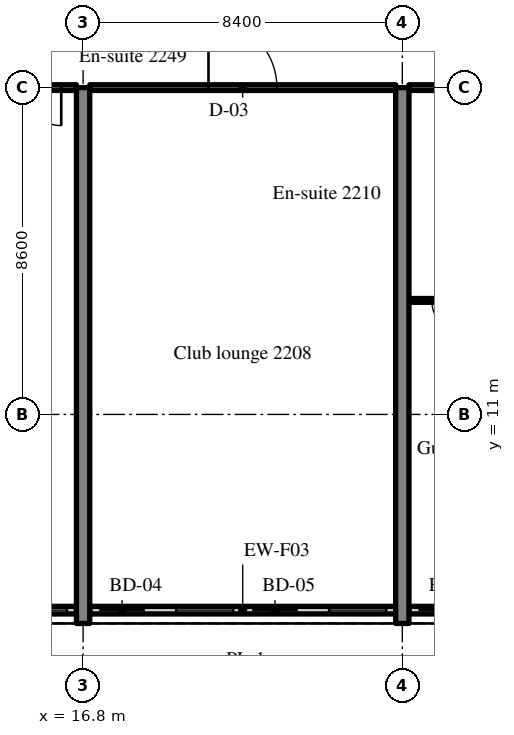
"""IFC4 building model, lengths in metres.
Left out: names, types, materials, properties, quantities, classifications, styles, units other than length and angle.
Written with IfcOpenShell. Run it as: python <this file> out.ifc"""

import sys

from ifc_helpers import new_model, si_unit, direction, frame, frame_2d, origin, place, context, subcontext, project, spatial, rectangle, extrude, source, transform, mapped, element, fill, save


model = new_model("IFC4")
c1 = context("Model", 3, precision=1e-05, world=origin(), true_north=direction((0.0, 1.0)))
c2 = subcontext(c1, "Body", "Model", "MODEL_VIEW")
j1 = project(units=[si_unit("LENGTHUNIT", "METRE"), si_unit("PLANEANGLEUNIT", "RADIAN")], contexts=[c1])
p1 = place(None, origin())
s1 = spatial("IfcSite", under=j1, at=p1, CompositionType="ELEMENT")
p2 = place(p1, origin())
s2 = spatial("IfcBuilding", under=s1, at=p2, CompositionType="ELEMENT")
p3 = place(p2, frame((0.0, 0.0, 95.2)))
s3 = spatial("IfcBuildingStorey", under=s2, at=p3, CompositionType="ELEMENT", Elevation=95.2)
m1 = source(origin(), c2, "Body", "SweptSolid", [
    extrude(rectangle(XDim=14.1, YDim=0.35, at=frame_2d((7.05, 0.0))), origin(), (0.0, 0.0, 1.0), 3.52),
])
for number, where, z_axis, x_axis in (
    (1, (16.8, 5.5, 0.0), (0.0, 0.0, 1.0), (0.0, 1.0, 0.0)),
    (2, (25.2, 5.5, 0.0), (0.0, 0.0, 1.0), (0.0, 1.0, 0.0)),
):
    element("IfcWall", number, at=place(p3, frame(where, z_axis=z_axis, x_axis=x_axis)), inside=s3, PredefinedType="SHEAR", context=c2, shape_type="MappedRepresentation", body=[
        mapped(m1, transform((0.0, 0.0, 0.0), scale=1.0)),
    ])
m2 = source(origin(), c2, "Body", "SweptSolid", [
    extrude(rectangle(XDim=8.05, YDim=0.2, at=frame_2d((4.025, 0.0))), origin(), (0.0, 0.0, 1.0), 2.82),
])
p4 = place(p3, frame((8.575, 5.85, 0.0), z_axis=(0.0, 0.0, 1.0), x_axis=(1.0, 0.0, 0.0)))
e3 = element("IfcWall", 3, at=p4, inside=s3, PredefinedType="SOLIDWALL", context=c2, shape_type="MappedRepresentation", body=[
    mapped(m2, transform((0.0, 0.0, 0.0), scale=1.0)),
])
m3 = source(origin(), c2, "Body", "SweptSolid", [
    extrude(rectangle(XDim=1.2, YDim=2.4, at=frame_2d((0.6, 1.2))), frame((0.0, 0.11, 0.0), z_axis=(0.0, -1.0, 0.0), x_axis=(1.0, 0.0, 0.0)), (0.0, 0.0, 1.0), 0.22),
])
p5 = place(p4, frame((0.25, 0.0, 0.0)))
e4 = element("IfcOpeningElement", 4, at=p5, cuts=e3, PredefinedType="OPENING", context=c2, shape_type="MappedRepresentation", body=[
    mapped(m3, transform((0.0, 0.0, 0.0), scale=1.0)),
])
m4 = source(origin(), c2, "Body", "SweptSolid", [
    extrude(rectangle(XDim=1.5, YDim=1.5, at=frame_2d((0.75, 0.75))), frame((0.0, 0.11, 0.0), z_axis=(0.0, -1.0, 0.0), x_axis=(1.0, 0.0, 0.0)), (0.0, 0.0, 1.0), 0.22),
])
p6 = place(p4, frame((2.275, 0.0, 0.9)))
e5 = element("IfcOpeningElement", 5, at=p6, cuts=e3, PredefinedType="OPENING", context=c2, shape_type="MappedRepresentation", body=[
    mapped(m4, transform((0.0, 0.0, 0.0), scale=1.0)),
])
p7 = place(p4, frame((4.275, 0.0, 0.0)))
e6 = element("IfcOpeningElement", 6, at=p7, cuts=e3, PredefinedType="OPENING", context=c2, shape_type="MappedRepresentation", body=[
    mapped(m3, transform((0.0, 0.0, 0.0), scale=1.0)),
])
p8 = place(p4, frame((6.3, 0.0, 0.9)))
e7 = element("IfcOpeningElement", 7, at=p8, cuts=e3, PredefinedType="OPENING", context=c2, shape_type="MappedRepresentation", body=[
    mapped(m4, transform((0.0, 0.0, 0.0), scale=1.0)),
])
m5 = source(origin(), c2, "Body", "SweptSolid", [
    extrude(rectangle(XDim=8.05, YDim=0.2, at=frame_2d((4.025, 0.0))), origin(), (0.0, 0.0, 1.0), 2.82),
])
p9 = place(p3, frame((16.975, 5.85, 0.0), z_axis=(0.0, 0.0, 1.0), x_axis=(1.0, 0.0, 0.0)))
e8 = element("IfcWall", 8, at=p9, inside=s3, PredefinedType="SOLIDWALL", context=c2, shape_type="MappedRepresentation", body=[
    mapped(m5, transform((0.0, 0.0, 0.0), scale=1.0)),
])
p10 = place(p9, frame((0.25, 0.0, 0.0)))
e9 = element("IfcOpeningElement", 9, at=p10, cuts=e8, PredefinedType="OPENING", context=c2, shape_type="MappedRepresentation", body=[
    mapped(m3, transform((0.0, 0.0, 0.0), scale=1.0)),
])
p11 = place(p9, frame((2.275, 0.0, 0.9)))
e10 = element("IfcOpeningElement", 10, at=p11, cuts=e8, PredefinedType="OPENING", context=c2, shape_type="MappedRepresentation", body=[
    mapped(m4, transform((0.0, 0.0, 0.0), scale=1.0)),
])
p12 = place(p9, frame((4.275, 0.0, 0.0)))
e11 = element("IfcOpeningElement", 11, at=p12, cuts=e8, PredefinedType="OPENING", context=c2, shape_type="MappedRepresentation", body=[
    mapped(m3, transform((0.0, 0.0, 0.0), scale=1.0)),
])
p13 = place(p9, frame((6.3, 0.0, 0.9)))
e12 = element("IfcOpeningElement", 12, at=p13, cuts=e8, PredefinedType="OPENING", context=c2, shape_type="MappedRepresentation", body=[
    mapped(m4, transform((0.0, 0.0, 0.0), scale=1.0)),
])
p14 = place(p3, frame((25.375, 5.85, 0.0), z_axis=(0.0, 0.0, 1.0), x_axis=(1.0, 0.0, 0.0)))
e13 = element("IfcWall", 13, at=p14, inside=s3, PredefinedType="SOLIDWALL", context=c2, shape_type="MappedRepresentation", body=[
    mapped(m2, transform((0.0, 0.0, 0.0), scale=1.0)),
])
p15 = place(p14, frame((0.25, 0.0, 0.0)))
e14 = element("IfcOpeningElement", 14, at=p15, cuts=e13, PredefinedType="OPENING", context=c2, shape_type="MappedRepresentation", body=[
    mapped(m3, transform((0.0, 0.0, 0.0), scale=1.0)),
])
p16 = place(p14, frame((2.275, 0.0, 0.9)))
e15 = element("IfcOpeningElement", 15, at=p16, cuts=e13, PredefinedType="OPENING", context=c2, shape_type="MappedRepresentation", body=[
    mapped(m4, transform((0.0, 0.0, 0.0), scale=1.0)),
])
p17 = place(p14, frame((4.275, 0.0, 0.0)))
e16 = element("IfcOpeningElement", 16, at=p17, cuts=e13, PredefinedType="OPENING", context=c2, shape_type="MappedRepresentation", body=[
    mapped(m3, transform((0.0, 0.0, 0.0), scale=1.0)),
])
p18 = place(p14, frame((6.3, 0.0, 0.9)))
e17 = element("IfcOpeningElement", 17, at=p18, cuts=e13, PredefinedType="OPENING", context=c2, shape_type="MappedRepresentation", body=[
    mapped(m4, transform((0.0, 0.0, 0.0), scale=1.0)),
])
m6 = source(origin(), c2, "Body", "SweptSolid", [
    extrude(rectangle(XDim=8.05, YDim=0.15, at=frame_2d((4.025, 0.0))), origin(), (0.0, 0.0, 1.0), 2.82),
])
p19 = place(p3, frame((8.575, 19.6, 0.0), z_axis=(0.0, 0.0, 1.0), x_axis=(1.0, 0.0, 0.0)))
e18 = element("IfcWall", 18, at=p19, inside=s3, PredefinedType="PARTITIONING", context=c2, shape_type="MappedRepresentation", body=[
    mapped(m6, transform((0.0, 0.0, 0.0), scale=1.0)),
])
m7 = source(origin(), c2, "Body", "SweptSolid", [
    extrude(rectangle(XDim=1.0, YDim=2.1, at=frame_2d((0.5, 1.05))), frame((0.0, 0.085, 0.0), z_axis=(0.0, -1.0, 0.0), x_axis=(1.0, 0.0, 0.0)), (0.0, 0.0, 1.0), 0.17),
])
p20 = place(p19, frame((6.65, 0.0, 0.0)))
e19 = element("IfcOpeningElement", 19, at=p20, cuts=e18, PredefinedType="OPENING", context=c2, shape_type="MappedRepresentation", body=[
    mapped(m7, transform((0.0, 0.0, 0.0), scale=1.0)),
])
m8 = source(origin(), c2, "Body", "SweptSolid", [
    extrude(rectangle(XDim=8.05, YDim=0.15, at=frame_2d((4.025, 0.0))), origin(), (0.0, 0.0, 1.0), 2.82),
])
p21 = place(p3, frame((16.975, 19.6, 0.0), z_axis=(0.0, 0.0, 1.0), x_axis=(1.0, 0.0, 0.0)))
e20 = element("IfcWall", 20, at=p21, inside=s3, PredefinedType="PARTITIONING", context=c2, shape_type="MappedRepresentation", body=[
    mapped(m8, transform((0.0, 0.0, 0.0), scale=1.0)),
])
m9 = source(origin(), c2, "Body", "SweptSolid", [
    extrude(rectangle(XDim=1.8, YDim=2.1, at=frame_2d((0.9, 1.05))), frame((0.0, 0.085, 0.0), z_axis=(0.0, -1.0, 0.0), x_axis=(1.0, 0.0, 0.0)), (0.0, 0.0, 1.0), 0.17),
])
p22 = place(p21, frame((3.125, 0.0, 0.0)))
e21 = element("IfcOpeningElement", 21, at=p22, cuts=e20, PredefinedType="OPENING", context=c2, shape_type="MappedRepresentation", body=[
    mapped(m9, transform((0.0, 0.0, 0.0), scale=1.0)),
])
m10 = source(origin(), c2, "Body", "SweptSolid", [
    extrude(rectangle(XDim=2.1, YDim=0.1, at=frame_2d((1.05, 0.0))), origin(), (0.0, 0.0, 1.0), 3.52),
])
p23 = place(p3, frame((25.375, 14.0, 0.0), z_axis=(0.0, 0.0, 1.0), x_axis=(1.0, 0.0, 0.0)))
e22 = element("IfcWall", 22, at=p23, inside=s3, PredefinedType="PARTITIONING", context=c2, shape_type="MappedRepresentation", body=[
    mapped(m10, transform((0.0, 0.0, 0.0), scale=1.0)),
])
m11 = source(origin(), c2, "Body", "SweptSolid", [
    extrude(rectangle(XDim=0.9, YDim=2.1, at=frame_2d((0.45, 1.05))), frame((0.0, 0.06, 0.0), z_axis=(0.0, -1.0, 0.0), x_axis=(1.0, 0.0, 0.0)), (0.0, 0.0, 1.0), 0.12),
])
p24 = place(p23, frame((0.6, 0.0, 0.0)))
e23 = element("IfcOpeningElement", 23, at=p24, cuts=e22, PredefinedType="OPENING", context=c2, shape_type="MappedRepresentation", body=[
    mapped(m11, transform((0.0, 0.0, 0.0), scale=1.0)),
])
m12 = source(origin(), c2, "Body", "SweptSolid", [
    extrude(rectangle(XDim=3.95, YDim=0.15, at=frame_2d((1.975, 0.0))), origin(), (0.0, 0.0, 1.0), 2.82),
])
p25 = place(p3, frame((25.375, 19.6, 0.0), z_axis=(0.0, 0.0, 1.0), x_axis=(1.0, 0.0, 0.0)))
e24 = element("IfcWall", 24, at=p25, inside=s3, PredefinedType="PARTITIONING", context=c2, shape_type="MappedRepresentation", body=[
    mapped(m12, transform((0.0, 0.0, 0.0), scale=1.0)),
])
p26 = place(p25, frame((2.55, 0.0, 0.0)))
e25 = element("IfcOpeningElement", 25, at=p26, cuts=e24, PredefinedType="OPENING", context=c2, shape_type="MappedRepresentation", body=[
    mapped(m7, transform((0.0, 0.0, 0.0), scale=1.0)),
])
m13 = source(origin(), c2, "Body", "SweptSolid", [
    extrude(rectangle(XDim=1.5, YDim=1.5, at=frame_2d((0.75, 0.75))), frame((0.0, 0.03, 0.0), z_axis=(0.0, -1.0, 0.0), x_axis=(1.0, 0.0, 0.0)), (0.0, 0.0, 1.0), 0.06),
])
p27 = place(p8, origin())
e26 = element("IfcWindow", 26, at=p27, inside=s3, PartitioningType="SINGLE_PANEL", PredefinedType="WINDOW", context=c2, shape_type="MappedRepresentation", body=[
    mapped(m13, transform((0.0, 0.0, 0.0), scale=1.0)),
])
fill(e7, e26)
m14 = source(origin(), c2, "Body", "SweptSolid", [
    extrude(rectangle(XDim=1.2, YDim=2.4, at=frame_2d((0.6, 1.2))), frame((0.0, 0.025, 0.0), z_axis=(0.0, -1.0, 0.0), x_axis=(1.0, 0.0, 0.0)), (0.0, 0.0, 1.0), 0.05),
])
p28 = place(p10, origin())
e27 = element("IfcDoor", 27, at=p28, inside=s3, OperationType="SLIDING_TO_RIGHT", PredefinedType="DOOR", context=c2, shape_type="MappedRepresentation", body=[
    mapped(m14, transform((0.0, 0.0, 0.0), scale=1.0)),
])
fill(e9, e27)
p29 = place(p11, origin())
e28 = element("IfcWindow", 28, at=p29, inside=s3, PartitioningType="SINGLE_PANEL", PredefinedType="WINDOW", context=c2, shape_type="MappedRepresentation", body=[
    mapped(m13, transform((0.0, 0.0, 0.0), scale=1.0)),
])
fill(e10, e28)
p30 = place(p12, origin())
e29 = element("IfcDoor", 29, at=p30, inside=s3, OperationType="SLIDING_TO_LEFT", PredefinedType="DOOR", context=c2, shape_type="MappedRepresentation", body=[
    mapped(m14, transform((0.0, 0.0, 0.0), scale=1.0)),
])
fill(e11, e29)
p31 = place(p13, origin())
e30 = element("IfcWindow", 30, at=p31, inside=s3, PartitioningType="SINGLE_PANEL", PredefinedType="WINDOW", context=c2, shape_type="MappedRepresentation", body=[
    mapped(m13, transform((0.0, 0.0, 0.0), scale=1.0)),
])
fill(e12, e30)
p32 = place(p15, origin())
e31 = element("IfcDoor", 31, at=p32, inside=s3, OperationType="SLIDING_TO_RIGHT", PredefinedType="DOOR", context=c2, shape_type="MappedRepresentation", body=[
    mapped(m14, transform((0.0, 0.0, 0.0), scale=1.0)),
])
fill(e14, e31)
m15 = source(origin(), c2, "Body", "SweptSolid", [
    extrude(rectangle(XDim=1.0, YDim=2.1, at=frame_2d((0.5, 1.05))), frame((0.0, 0.025, 0.0), z_axis=(0.0, -1.0, 0.0), x_axis=(1.0, 0.0, 0.0)), (0.0, 0.0, 1.0), 0.05),
])
p33 = place(p20, origin())
e32 = element("IfcDoor", 32, at=p33, inside=s3, OperationType="SINGLE_SWING_RIGHT", PredefinedType="DOOR", context=c2, shape_type="MappedRepresentation", body=[
    mapped(m15, transform((0.0, 0.0, 0.0), scale=1.0)),
])
fill(e19, e32)
m16 = source(origin(), c2, "Body", "SweptSolid", [
    extrude(rectangle(XDim=1.8, YDim=2.1, at=frame_2d((0.9, 1.05))), frame((0.0, 0.025, 0.0), z_axis=(0.0, -1.0, 0.0), x_axis=(1.0, 0.0, 0.0)), (0.0, 0.0, 1.0), 0.05),
])
p34 = place(p22, origin())
e33 = element("IfcDoor", 33, at=p34, inside=s3, OperationType="DOUBLE_DOOR_SINGLE_SWING", PredefinedType="DOOR", context=c2, shape_type="MappedRepresentation", body=[
    mapped(m16, transform((0.0, 0.0, 0.0), scale=1.0)),
])
fill(e21, e33)
m17 = source(origin(), c2, "Body", "SweptSolid", [
    extrude(rectangle(XDim=0.9, YDim=2.1, at=frame_2d((0.45, 1.05))), frame((0.0, 0.025, 0.0), z_axis=(0.0, -1.0, 0.0), x_axis=(1.0, 0.0, 0.0)), (0.0, 0.0, 1.0), 0.05),
])
p35 = place(p24, origin())
e34 = element("IfcDoor", 34, at=p35, inside=s3, OperationType="SINGLE_SWING_RIGHT", PredefinedType="DOOR", context=c2, shape_type="MappedRepresentation", body=[
    mapped(m17, transform((0.0, 0.0, 0.0), scale=1.0)),
])
fill(e23, e34)
save(model, sys.argv[1])
